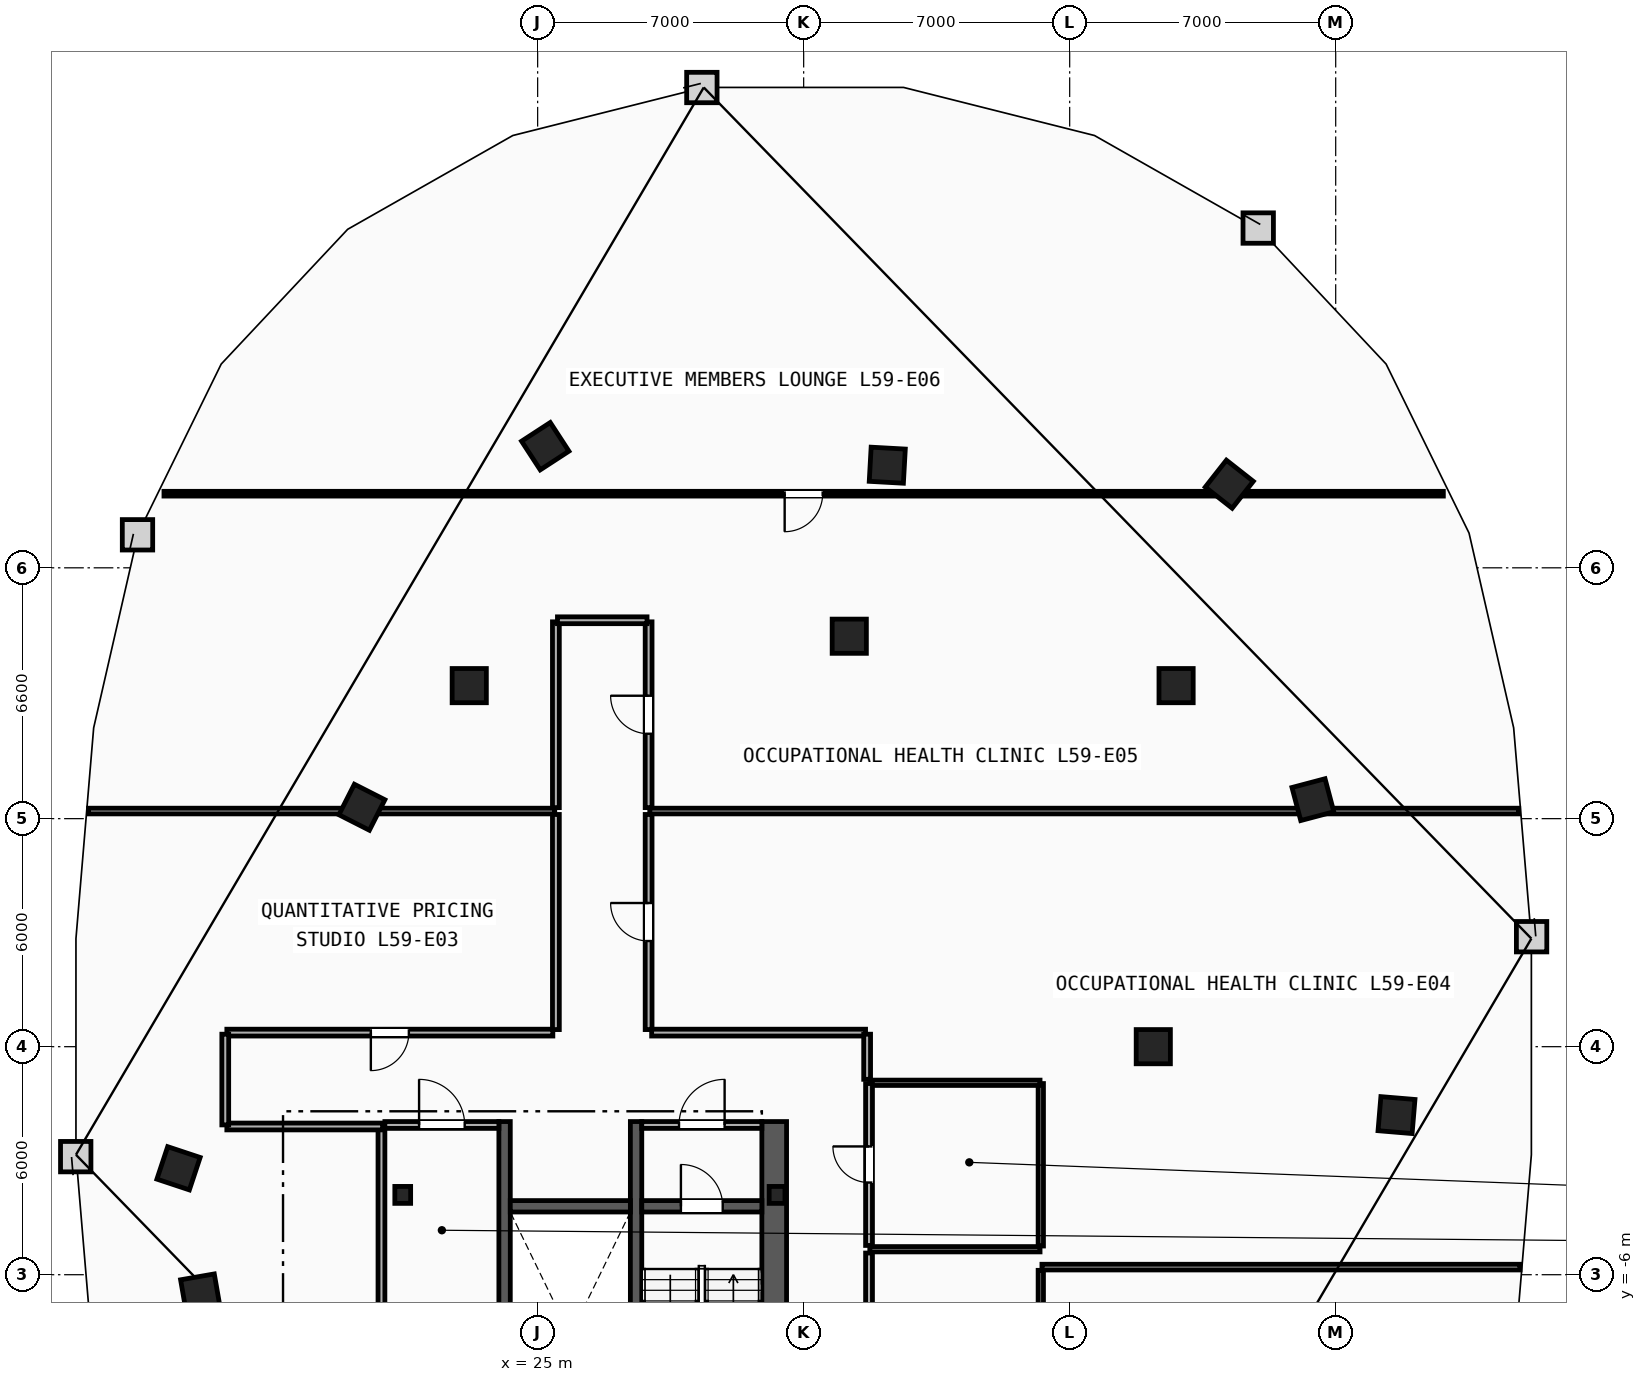
"""IFC4 building model, lengths in metres.
Left out: names, types, materials, properties, quantities, classifications, styles, units other than length and angle.
Written with IfcOpenShell. Run it as: python <this file> out.ifc"""

import sys

from ifc_helpers import new_model, si_unit, direction, frame, frame_2d, origin, origin_2d, place, context, subcontext, project, spatial, rectangle, i_section, extrude, element, fill, save


model = new_model("IFC4")
c1 = context("Model", 3, precision=1e-05, world=origin(), true_north=direction((0.0, 1.0)))
c2 = subcontext(c1, "Body", "Model", "MODEL_VIEW")
j1 = project(units=[si_unit("LENGTHUNIT", "METRE"), si_unit("PLANEANGLEUNIT", "RADIAN")], contexts=[c1])
p1 = place(None, origin())
s1 = spatial("IfcSite", under=j1, at=p1, CompositionType="ELEMENT")
p2 = place(p1, origin())
s2 = spatial("IfcBuilding", under=s1, at=p2, CompositionType="ELEMENT")
p3 = place(p2, frame((0.0, 0.0, 224.2)))
s3 = spatial("IfcBuildingStorey", under=s2, at=p3, CompositionType="ELEMENT", Elevation=224.2)
for number, where, z_axis, x_axis in (
    (1, (31.3, -3.9, 0.0), (0.0, 0.0, 1.0), (1.0, 0.0, 0.0)),
    (2, (21.45, -3.9, 0.0), (0.0, 0.0, 1.0), (1.0, 0.0, 0.0)),
):
    element("IfcColumn", number, at=place(p3, frame(where, z_axis=z_axis, x_axis=x_axis)), inside=s3, PredefinedType="COLUMN", context=c2, shape_type="SweptSolid", body=[
        extrude(i_section(OverallWidth=0.416, OverallDepth=0.446, WebThickness=0.039, FlangeThickness=0.063, FilletRadius=0.018, at=origin_2d()), origin(), (0.0, 0.0, 1.0), 3.6),
    ])
for number, where, z_axis, x_axis in (
    (3, (41.2, 0.0, 0.0), (0.0, 0.0, 1.0), (1.0, 0.0, 0.0)),
    (4, (41.8, 9.5, 0.0), (0.0, 0.0, 1.0), (1.0, 0.0, 0.0)),
    (5, (33.2, 10.8, 0.0), (0.0, 0.0, 1.0), (1.0, 0.0, 0.0)),
    (6, (23.2, 9.5, 0.0), (0.0, 0.0, 1.0), (1.0, 0.0, 0.0)),
    (7, (15.55, -3.2, 0.0), (0.0, 0.0, 1.0), (-0.315, -0.949, 0.0)),
    (8, (16.125, -6.5, 0.0), (0.0, 0.0, 1.0), (0.172, -0.985, 0.0)),
    (9, (47.6, -1.8, 0.0), (0.0, 0.0, 1.0), (0.084, 0.997, 0.0)),
    (10, (45.4, 6.5, 0.0), (0.0, 0.0, 1.0), (-0.256, 0.967, 0.0)),
    (11, (43.2, 14.8, 0.0), (0.0, 0.0, 1.0), (-0.786, 0.618, 0.0)),
    (12, (34.2, 15.3, 0.0), (0.0, 0.0, 1.0), (-0.998, 0.055, 0.0)),
    (13, (25.2, 15.8, 0.0), (0.0, 0.0, 1.0), (-0.838, -0.546, 0.0)),
    (14, (20.375, 6.3, 0.0), (0.0, 0.0, 1.0), (-0.453, -0.892, 0.0)),
):
    element("IfcColumn", number, at=place(p3, frame(where, z_axis=z_axis, x_axis=x_axis)), inside=s3, PredefinedType="COLUMN", context=c2, shape_type="SweptSolid", body=[
        extrude(rectangle(XDim=0.9, YDim=0.9, at=origin_2d()), origin(), (0.0, 0.0, 1.0), 3.6),
    ])
p4 = place(p3, frame((31.225, -15.3, 0.0), z_axis=(0.0, 0.0, 1.0), x_axis=(0.0, 1.0, 0.0)))
e15 = element("IfcWall", 15, at=p4, inside=s3, PredefinedType="SHEAR", context=c2, shape_type="SweptSolid", body=[
    extrude(rectangle(XDim=13.33, YDim=0.65, at=frame_2d((6.665, 0.0))), origin(), (0.0, 0.0, 1.0), 3.34),
])
for number, where, z_axis, x_axis in (
    (16, (27.59, -12.65, 0.0), (0.0, 0.0, 1.0), (0.0, 1.0, 0.0)),
    (17, (24.13, -12.65, 0.0), (0.0, 0.0, 1.0), (0.0, 1.0, 0.0)),
):
    element("IfcWall", number, at=place(p3, frame(where, z_axis=z_axis, x_axis=x_axis)), inside=s3, PredefinedType="SHEAR", context=c2, shape_type="SweptSolid", body=[
        extrude(rectangle(XDim=10.68, YDim=0.3, at=frame_2d((5.34, 0.0))), origin(), (0.0, 0.0, 1.0), 3.34),
    ])
p5 = place(p3, frame((27.74, -4.2, 0.0), z_axis=(0.0, 0.0, 1.0), x_axis=(1.0, 0.0, 0.0)))
e18 = element("IfcWall", 18, at=p5, inside=s3, PredefinedType="SHEAR", context=c2, shape_type="SweptSolid", body=[
    extrude(rectangle(XDim=3.16, YDim=0.3, at=frame_2d((1.58, 0.0))), origin(), (0.0, 0.0, 1.0), 3.34),
])
p6 = place(p5, frame((1.03, 0.0, 0.0)))
e19 = element("IfcOpeningElement", 19, at=p6, cuts=e18, PredefinedType="OPENING", context=c2, shape_type="SweptSolid", body=[
    extrude(rectangle(XDim=1.1, YDim=2.15, at=frame_2d((0.55, 1.075))), frame((0.0, 0.16, 0.0), z_axis=(0.0, -1.0, 0.0), x_axis=(1.0, 0.0, 0.0)), (0.0, 0.0, 1.0), 0.32),
])
p7 = place(p3, frame((24.28, -4.2, 0.0), z_axis=(0.0, 0.0, 1.0), x_axis=(1.0, 0.0, 0.0)))
e20 = element("IfcWall", 20, at=p7, inside=s3, PredefinedType="SHEAR", context=c2, shape_type="SweptSolid", body=[
    extrude(rectangle(XDim=3.16, YDim=0.3, at=frame_2d((1.58, 0.0))), origin(), (0.0, 0.0, 1.0), 3.34),
])
p8 = place(p3, frame((20.89, -7.45, 0.0), z_axis=(0.0, 0.0, 1.0), x_axis=(0.0, 1.0, 0.0)))
e21 = element("IfcWall", 21, at=p8, inside=s3, PredefinedType="PARTITIONING", context=c2, shape_type="SweptSolid", body=[
    extrude(rectangle(XDim=5.3, YDim=0.18, at=frame_2d((2.65, 0.0))), origin(), (0.0, 0.0, 1.0), 3.34),
])
p9 = place(p3, frame((20.98, -2.06, 0.0), z_axis=(0.0, 0.0, 1.0), x_axis=(1.0, 0.0, 0.0)))
e22 = element("IfcWall", 22, at=p9, inside=s3, PredefinedType="PARTITIONING", context=c2, shape_type="SweptSolid", body=[
    extrude(rectangle(XDim=3.0, YDim=0.18, at=frame_2d((1.5, 0.0))), origin(), (0.0, 0.0, 1.0), 3.34),
])
p10 = place(p9, frame((0.9, 0.0, 0.0)))
e23 = element("IfcOpeningElement", 23, at=p10, cuts=e22, PredefinedType="OPENING", context=c2, shape_type="SweptSolid", body=[
    extrude(rectangle(XDim=1.2, YDim=2.15, at=frame_2d((0.6, 1.075))), frame((0.0, 0.1, 0.0), z_axis=(0.0, -1.0, 0.0), x_axis=(1.0, 0.0, 0.0)), (0.0, 0.0, 1.0), 0.2),
])
p11 = place(p3, frame((27.74, -2.06, 0.0), z_axis=(0.0, 0.0, 1.0), x_axis=(1.0, 0.0, 0.0)))
e24 = element("IfcWall", 24, at=p11, inside=s3, PredefinedType="PARTITIONING", context=c2, shape_type="SweptSolid", body=[
    extrude(rectangle(XDim=3.16, YDim=0.18, at=frame_2d((1.58, 0.0))), origin(), (0.0, 0.0, 1.0), 3.34),
])
p12 = place(p11, frame((0.98, 0.0, 0.0)))
e25 = element("IfcOpeningElement", 25, at=p12, cuts=e24, PredefinedType="OPENING", context=c2, shape_type="SweptSolid", body=[
    extrude(rectangle(XDim=1.2, YDim=2.15, at=frame_2d((0.6, 1.075))), frame((0.0, 0.1, 0.0), z_axis=(0.0, -1.0, 0.0), x_axis=(1.0, 0.0, 0.0)), (0.0, 0.0, 1.0), 0.2),
])
p13 = place(p3, frame((38.24, -9.59, 0.0), z_axis=(0.0, 0.0, 1.0), x_axis=(0.0, 1.0, 0.0)))
e26 = element("IfcWall", 26, at=p13, inside=s3, PredefinedType="PARTITIONING", context=c2, shape_type="SweptSolid", body=[
    extrude(rectangle(XDim=3.705, YDim=0.14, at=frame_2d((1.853, 0.0))), origin(), (0.0, 0.0, 1.0), 3.34),
])
p14 = place(p3, frame((38.24, -5.245, 0.0), z_axis=(0.0, 0.0, 1.0), x_axis=(0.0, 1.0, 0.0)))
e27 = element("IfcWall", 27, at=p14, inside=s3, PredefinedType="PARTITIONING", context=c2, shape_type="SweptSolid", body=[
    extrude(rectangle(XDim=4.275, YDim=0.14, at=frame_2d((2.138, 0.0))), origin(), (0.0, 0.0, 1.0), 3.34),
])
for number, where, z_axis, x_axis in (
    (28, (33.74, -0.95, 0.0), (0.0, 0.0, 1.0), (1.0, 0.0, 0.0)),
    (29, (33.74, -5.33, 0.0), (0.0, 0.0, 1.0), (1.0, 0.0, 0.0)),
):
    element("IfcWall", number, at=place(p3, frame(where, z_axis=z_axis, x_axis=x_axis)), inside=s3, PredefinedType="PARTITIONING", context=c2, shape_type="SweptSolid", body=[
        extrude(rectangle(XDim=4.48, YDim=0.14, at=frame_2d((2.24, 0.0))), origin(), (0.0, 0.0, 1.0), 3.34),
    ])
p15 = place(p3, frame((33.72, -5.23, 0.0), z_axis=(0.0, 0.0, 1.0), x_axis=(0.0, 1.0, 0.0)))
e30 = element("IfcWall", 30, at=p15, inside=s3, PredefinedType="PARTITIONING", context=c2, shape_type="SweptSolid", body=[
    extrude(rectangle(XDim=4.26, YDim=0.18, at=frame_2d((2.13, 0.0))), origin(), (0.0, 0.0, 1.0), 3.34),
])
p16 = place(p15, frame((1.655, 0.0, 0.0)))
e31 = element("IfcOpeningElement", 31, at=p16, cuts=e30, PredefinedType="OPENING", context=c2, shape_type="SweptSolid", body=[
    extrude(rectangle(XDim=0.95, YDim=2.1, at=frame_2d((0.475, 1.05))), frame((0.0, 0.1, 0.0), z_axis=(0.0, -1.0, 0.0), x_axis=(1.0, 0.0, 0.0)), (0.0, 0.0, 1.0), 0.2),
])
p17 = place(p3, frame((33.72, -9.59, 0.0), z_axis=(0.0, 0.0, 1.0), x_axis=(0.0, 1.0, 0.0)))
e32 = element("IfcWall", 32, at=p17, inside=s3, PredefinedType="PARTITIONING", context=c2, shape_type="SweptSolid", body=[
    extrude(rectangle(XDim=4.16, YDim=0.18, at=frame_2d((2.08, 0.0))), origin(), (0.0, 0.0, 1.0), 3.34),
])
p18 = place(p17, frame((1.58, 0.0, 0.0)))
e33 = element("IfcOpeningElement", 33, at=p18, cuts=e32, PredefinedType="OPENING", context=c2, shape_type="SweptSolid", body=[
    extrude(rectangle(XDim=1.0, YDim=2.15, at=frame_2d((0.5, 1.075))), frame((0.0, 0.1, 0.0), z_axis=(0.0, -1.0, 0.0), x_axis=(1.0, 0.0, 0.0)), (0.0, 0.0, 1.0), 0.2),
])
p19 = place(p3, frame((13.183, 6.2, 0.0), z_axis=(0.0, 0.0, 1.0), x_axis=(1.0, 0.0, 0.0)))
e34 = element("IfcWall", 34, at=p19, inside=s3, PredefinedType="PARTITIONING", context=c2, shape_type="SweptSolid", body=[
    extrude(rectangle(XDim=12.267, YDim=0.15, at=frame_2d((6.133, 0.0))), origin(), (0.0, 0.0, 1.0), 3.34),
])
p20 = place(p3, frame((27.95, 6.2, 0.0), z_axis=(0.0, 0.0, 1.0), x_axis=(1.0, 0.0, 0.0)))
e35 = element("IfcWall", 35, at=p20, inside=s3, PredefinedType="PARTITIONING", context=c2, shape_type="SweptSolid", body=[
    extrude(rectangle(XDim=22.867, YDim=0.15, at=frame_2d((11.434, 0.0))), origin(), (0.0, 0.0, 1.0), 3.34),
])
p21 = place(p3, frame((38.27, -5.8, 0.0), z_axis=(0.0, 0.0, 1.0), x_axis=(1.0, 0.0, 0.0)))
e36 = element("IfcWall", 36, at=p21, inside=s3, PredefinedType="PARTITIONING", context=c2, shape_type="SweptSolid", body=[
    extrude(rectangle(XDim=12.581, YDim=0.15, at=frame_2d((6.29, 0.0))), origin(), (0.0, 0.0, 1.0), 3.34),
])
p22 = place(p3, frame((25.4, 0.37, 0.0), z_axis=(0.0, 0.0, 1.0), x_axis=(-1.0, 0.0, 0.0)))
e37 = element("IfcWall", 37, at=p22, inside=s3, PredefinedType="PARTITIONING", context=c2, shape_type="SweptSolid", body=[
    extrude(rectangle(XDim=8.578, YDim=0.18, at=frame_2d((4.289, 0.0))), origin(), (0.0, 0.0, 1.0), 3.34),
])
p23 = place(p22, frame((3.789, 0.0, 0.0)))
e38 = element("IfcOpeningElement", 38, at=p23, cuts=e37, PredefinedType="OPENING", context=c2, shape_type="SweptSolid", body=[
    extrude(rectangle(XDim=1.0, YDim=2.15, at=frame_2d((0.5, 1.075))), frame((0.0, 0.1, 0.0), z_axis=(0.0, -1.0, 0.0), x_axis=(1.0, 0.0, 0.0)), (0.0, 0.0, 1.0), 0.2),
])
p24 = place(p3, frame((25.48, 6.11, 0.0), z_axis=(0.0, 0.0, 1.0), x_axis=(0.0, -1.0, 0.0)))
e39 = element("IfcWall", 39, at=p24, inside=s3, PredefinedType="PARTITIONING", context=c2, shape_type="SweptSolid", body=[
    extrude(rectangle(XDim=5.66, YDim=0.18, at=frame_2d((2.83, 0.0))), origin(), (0.0, 0.0, 1.0), 3.34),
])
p25 = place(p3, frame((16.822, -2.1, 0.0), z_axis=(0.0, 0.0, 1.0), x_axis=(1.0, 0.0, 0.0)))
e40 = element("IfcWall", 40, at=p25, inside=s3, PredefinedType="PARTITIONING", context=c2, shape_type="SweptSolid", body=[
    extrude(rectangle(XDim=4.098, YDim=0.18, at=frame_2d((2.049, 0.0))), origin(), (0.0, 0.0, 1.0), 3.34),
])
p26 = place(p3, frame((16.78, 0.329, 0.0), z_axis=(0.0, 0.0, 1.0), x_axis=(0.0, -1.0, 0.0)))
e41 = element("IfcWall", 41, at=p26, inside=s3, PredefinedType="PARTITIONING", context=c2, shape_type="SweptSolid", body=[
    extrude(rectangle(XDim=2.387, YDim=0.18, at=frame_2d((1.194, 0.0))), origin(), (0.0, 0.0, 1.0), 3.34),
])
p27 = place(p3, frame((27.92, 0.45, 0.0), z_axis=(0.0, 0.0, 1.0), x_axis=(0.0, 1.0, 0.0)))
e42 = element("IfcWall", 42, at=p27, inside=s3, PredefinedType="PARTITIONING", context=c2, shape_type="SweptSolid", body=[
    extrude(rectangle(XDim=5.66, YDim=0.18, at=frame_2d((2.83, 0.0))), origin(), (0.0, 0.0, 1.0), 3.34),
])
p28 = place(p27, frame((2.33, 0.0, 0.0)))
e43 = element("IfcOpeningElement", 43, at=p28, cuts=e42, PredefinedType="OPENING", context=c2, shape_type="SweptSolid", body=[
    extrude(rectangle(XDim=1.0, YDim=2.15, at=frame_2d((0.5, 1.075))), frame((0.0, 0.1, 0.0), z_axis=(0.0, -1.0, 0.0), x_axis=(1.0, 0.0, 0.0)), (0.0, 0.0, 1.0), 0.2),
])
p29 = place(p3, frame((33.628, 0.37, 0.0), z_axis=(0.0, 0.0, 1.0), x_axis=(-1.0, 0.0, 0.0)))
e44 = element("IfcWall", 44, at=p29, inside=s3, PredefinedType="PARTITIONING", context=c2, shape_type="SweptSolid", body=[
    extrude(rectangle(XDim=5.628, YDim=0.18, at=frame_2d((2.814, 0.0))), origin(), (0.0, 0.0, 1.0), 3.34),
])
p30 = place(p3, frame((33.67, -0.859, 0.0), z_axis=(0.0, 0.0, 1.0), x_axis=(0.0, 1.0, 0.0)))
e45 = element("IfcWall", 45, at=p30, inside=s3, PredefinedType="PARTITIONING", context=c2, shape_type="SweptSolid", body=[
    extrude(rectangle(XDim=1.187, YDim=0.18, at=frame_2d((0.594, 0.0))), origin(), (0.0, 0.0, 1.0), 3.34),
])
p31 = place(p3, frame((27.92, 6.29, 0.0), z_axis=(0.0, 0.0, 1.0), x_axis=(0.0, 1.0, 0.0)))
e46 = element("IfcWall", 46, at=p31, inside=s3, PredefinedType="PARTITIONING", context=c2, shape_type="SweptSolid", body=[
    extrude(rectangle(XDim=4.888, YDim=0.18, at=frame_2d((2.444, 0.0))), origin(), (0.0, 0.0, 1.0), 3.34),
])
p32 = place(p31, frame((1.944, 0.0, 0.0)))
e47 = element("IfcOpeningElement", 47, at=p32, cuts=e46, PredefinedType="OPENING", context=c2, shape_type="SweptSolid", body=[
    extrude(rectangle(XDim=1.0, YDim=2.15, at=frame_2d((0.5, 1.075))), frame((0.0, 0.1, 0.0), z_axis=(0.0, -1.0, 0.0), x_axis=(1.0, 0.0, 0.0)), (0.0, 0.0, 1.0), 0.2),
])
p33 = place(p3, frame((25.48, 11.178, 0.0), z_axis=(0.0, 0.0, 1.0), x_axis=(0.0, -1.0, 0.0)))
e48 = element("IfcWall", 48, at=p33, inside=s3, PredefinedType="PARTITIONING", context=c2, shape_type="SweptSolid", body=[
    extrude(rectangle(XDim=4.888, YDim=0.18, at=frame_2d((2.444, 0.0))), origin(), (0.0, 0.0, 1.0), 3.34),
])
p34 = place(p3, frame((27.878, 11.22, 0.0), z_axis=(0.0, 0.0, 1.0), x_axis=(-1.0, 0.0, 0.0)))
e49 = element("IfcWall", 49, at=p34, inside=s3, PredefinedType="PARTITIONING", context=c2, shape_type="SweptSolid", body=[
    extrude(rectangle(XDim=2.357, YDim=0.18, at=frame_2d((1.178, 0.0))), origin(), (0.0, 0.0, 1.0), 3.34),
])
p35 = place(p3, frame((48.833, 14.55, 0.0), z_axis=(0.0, 0.0, 1.0), x_axis=(-1.0, 0.0, 0.0)))
e50 = element("IfcWall", 50, at=p35, inside=s3, PredefinedType="PARTITIONING", context=c2, shape_type="SweptSolid", body=[
    extrude(rectangle(XDim=33.666, YDim=0.125, at=frame_2d((16.833, 0.0))), origin(), (0.0, 0.0, 1.0), 3.34),
])
p36 = place(p35, frame((16.333, 0.0, 0.0)))
e51 = element("IfcOpeningElement", 51, at=p36, cuts=e50, PredefinedType="OPENING", context=c2, shape_type="SweptSolid", body=[
    extrude(rectangle(XDim=1.0, YDim=2.15, at=frame_2d((0.5, 1.075))), frame((0.0, 0.073, 0.0), z_axis=(0.0, -1.0, 0.0), x_axis=(1.0, 0.0, 0.0)), (0.0, 0.0, 1.0), 0.145),
])
p37 = place(p6, origin())
e52 = element("IfcDoor", 52, at=p37, inside=s3, OperationType="SINGLE_SWING_LEFT", PredefinedType="DOOR", context=c2, shape_type="SweptSolid", body=[
    extrude(rectangle(XDim=1.1, YDim=2.15, at=frame_2d((0.55, 1.075))), frame((0.0, 0.025, 0.0), z_axis=(0.0, -1.0, 0.0), x_axis=(1.0, 0.0, 0.0)), (0.0, 0.0, 1.0), 0.05),
])
fill(e19, e52)
p38 = place(p10, origin())
e53 = element("IfcDoor", 53, at=p38, inside=s3, OperationType="SINGLE_SWING_LEFT", PredefinedType="DOOR", context=c2, shape_type="SweptSolid", body=[
    extrude(rectangle(XDim=1.2, YDim=2.15, at=frame_2d((0.6, 1.075))), frame((0.0, 0.025, 0.0), z_axis=(0.0, -1.0, 0.0), x_axis=(1.0, 0.0, 0.0)), (0.0, 0.0, 1.0), 0.05),
])
fill(e23, e53)
p39 = place(p12, origin())
e54 = element("IfcDoor", 54, at=p39, inside=s3, OperationType="SINGLE_SWING_RIGHT", PredefinedType="DOOR", context=c2, shape_type="SweptSolid", body=[
    extrude(rectangle(XDim=1.2, YDim=2.15, at=frame_2d((0.6, 1.075))), frame((0.0, 0.025, 0.0), z_axis=(0.0, -1.0, 0.0), x_axis=(1.0, 0.0, 0.0)), (0.0, 0.0, 1.0), 0.05),
])
fill(e25, e54)
p40 = place(p36, origin())
e55 = element("IfcDoor", 55, at=p40, inside=s3, OperationType="SINGLE_SWING_RIGHT", PredefinedType="DOOR", context=c2, shape_type="SweptSolid", body=[
    extrude(rectangle(XDim=1.0, YDim=2.15, at=frame_2d((0.5, 1.075))), frame((0.0, 0.025, 0.0), z_axis=(0.0, -1.0, 0.0), x_axis=(1.0, 0.0, 0.0)), (0.0, 0.0, 1.0), 0.05),
])
fill(e51, e55)
p41 = place(p23, origin())
e56 = element("IfcDoor", 56, at=p41, inside=s3, OperationType="SINGLE_SWING_RIGHT", PredefinedType="DOOR", context=c2, shape_type="SweptSolid", body=[
    extrude(rectangle(XDim=1.0, YDim=2.15, at=frame_2d((0.5, 1.075))), frame((0.0, 0.025, 0.0), z_axis=(0.0, -1.0, 0.0), x_axis=(1.0, 0.0, 0.0)), (0.0, 0.0, 1.0), 0.05),
])
fill(e38, e56)
p42 = place(p28, origin())
e57 = element("IfcDoor", 57, at=p42, inside=s3, OperationType="SINGLE_SWING_RIGHT", PredefinedType="DOOR", context=c2, shape_type="SweptSolid", body=[
    extrude(rectangle(XDim=1.0, YDim=2.15, at=frame_2d((0.5, 1.075))), frame((0.0, 0.025, 0.0), z_axis=(0.0, -1.0, 0.0), x_axis=(1.0, 0.0, 0.0)), (0.0, 0.0, 1.0), 0.05),
])
fill(e43, e57)
p43 = place(p32, origin())
e58 = element("IfcDoor", 58, at=p43, inside=s3, OperationType="SINGLE_SWING_RIGHT", PredefinedType="DOOR", context=c2, shape_type="SweptSolid", body=[
    extrude(rectangle(XDim=1.0, YDim=2.15, at=frame_2d((0.5, 1.075))), frame((0.0, 0.025, 0.0), z_axis=(0.0, -1.0, 0.0), x_axis=(1.0, 0.0, 0.0)), (0.0, 0.0, 1.0), 0.05),
])
fill(e47, e58)
p44 = place(p16, origin())
e59 = element("IfcDoor", 59, at=p44, inside=s3, OperationType="SINGLE_SWING_RIGHT", PredefinedType="DOOR", context=c2, shape_type="SweptSolid", body=[
    extrude(rectangle(XDim=0.95, YDim=2.1, at=frame_2d((0.475, 1.05))), frame((0.0, 0.025, 0.0), z_axis=(0.0, -1.0, 0.0), x_axis=(1.0, 0.0, 0.0)), (0.0, 0.0, 1.0), 0.05),
])
fill(e31, e59)
save(model, sys.argv[1])
